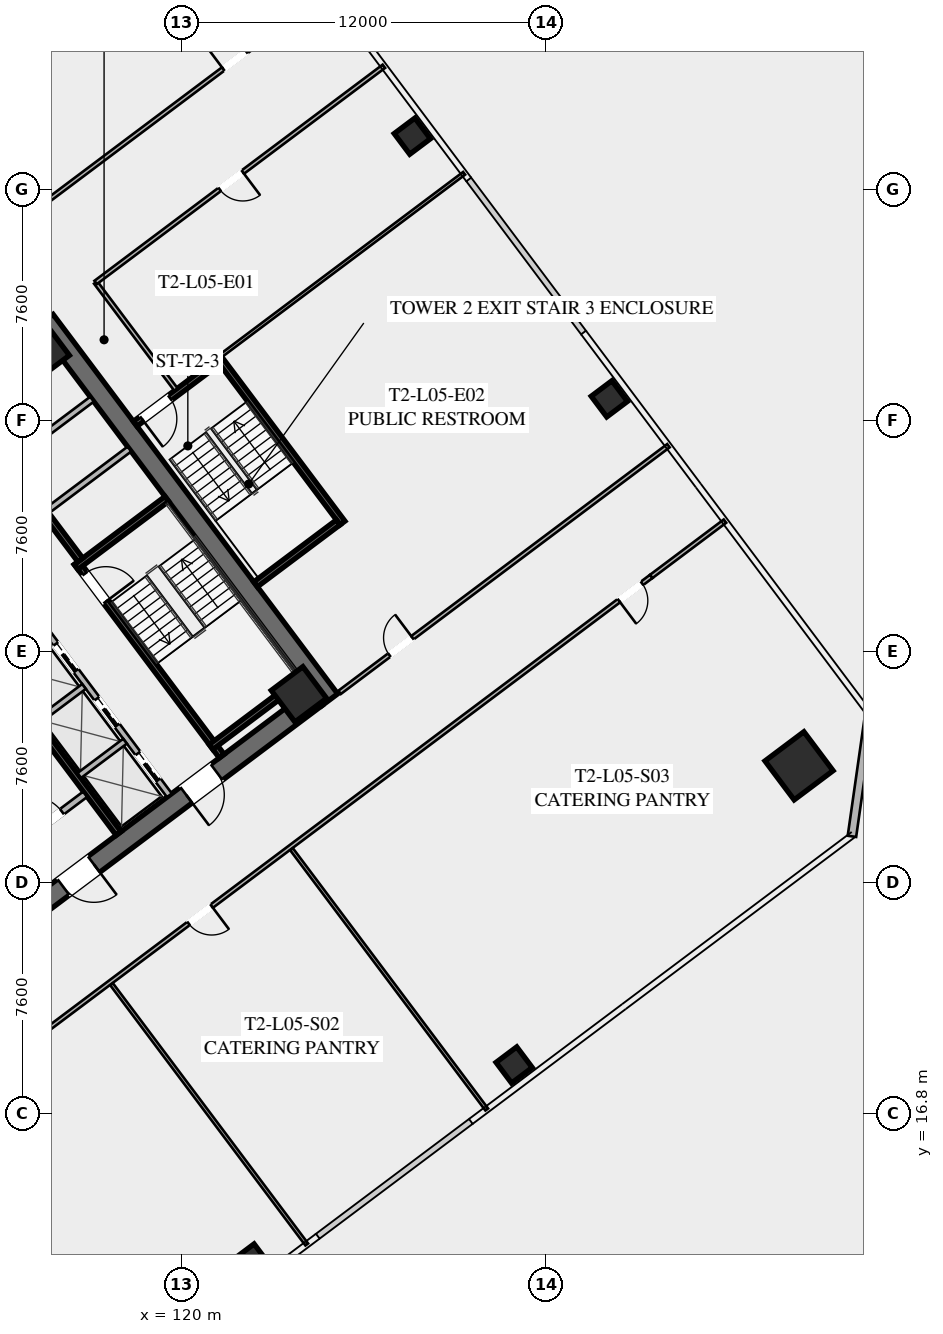
"""IFC4 building model, lengths in metres.
Left out: names, types, materials, properties, quantities, classifications, styles, units other than length and angle.
Written with IfcOpenShell. Run it as: python <this file> out.ifc"""

import sys

from ifc_helpers import new_model, si_unit, direction, frame, frame_2d, origin, origin_2d, place, context, subcontext, project, spatial, rectangle, hollow_rectangle, extrude, element, fill, save


model = new_model("IFC4")
c1 = context("Model", 3, precision=1e-05, world=origin(), true_north=direction((0.0, 1.0)))
c2 = subcontext(c1, "Body", "Model", "MODEL_VIEW")
j1 = project(units=[si_unit("LENGTHUNIT", "METRE"), si_unit("PLANEANGLEUNIT", "RADIAN")], contexts=[c1])
p1 = place(None, origin())
s1 = spatial("IfcSite", under=j1, at=p1, CompositionType="ELEMENT")
p2 = place(p1, origin())
s2 = spatial("IfcBuilding", under=s1, at=p2, CompositionType="ELEMENT")
p3 = place(p2, frame((0.0, 0.0, 24.6)))
s3 = spatial("IfcBuildingStorey", under=s2, at=p3, CompositionType="ELEMENT", Elevation=24.6)
p4 = place(p3, frame((115.524, 42.893, 0.0), z_axis=(0.0, 0.0, 1.0), x_axis=(0.600005007985, -0.799996243986, 0.0)))
e1 = element("IfcWall", 1, at=p4, inside=s3, PredefinedType="SHEAR", context=c2, shape_type="SweptSolid", body=[
    extrude(rectangle(XDim=15.6, YDim=0.65, at=frame_2d((7.8, 0.0))), origin(), (0.0, 0.0, 1.0), 3.55),
])
p5 = place(p3, frame((124.429, 30.478, 0.0), z_axis=(0.0, 0.0, 1.0), x_axis=(-0.799998028465, -0.600002628705, 0.0)))
e2 = element("IfcWall", 2, at=p5, inside=s3, PredefinedType="SHEAR", context=c2, shape_type="SweptSolid", body=[
    extrude(rectangle(XDim=14.86, YDim=0.65, at=frame_2d((7.43, 0.0))), origin(), (0.0, 0.0, 1.0), 3.55),
])
p6 = place(p5, frame((9.13, 0.0, 0.0)))
e3 = element("IfcOpeningElement", 3, at=p6, cuts=e2, PredefinedType="OPENING", context=c2, shape_type="SweptSolid", body=[
    extrude(rectangle(XDim=1.25, YDim=2.25, at=frame_2d((0.625, 1.125))), frame((0.0, 0.335, 0.0), z_axis=(0.0, -1.0, 0.0), x_axis=(1.0, 0.0, 0.0)), (0.0, 0.0, 1.0), 0.67),
])
p7 = place(p5, frame((4.08, 0.0, 0.0)))
e4 = element("IfcOpeningElement", 4, at=p7, cuts=e2, PredefinedType="OPENING", context=c2, shape_type="SweptSolid", body=[
    extrude(rectangle(XDim=1.25, YDim=2.25, at=frame_2d((0.625, 1.125))), frame((0.0, 0.335, 0.0), z_axis=(0.0, -1.0, 0.0), x_axis=(1.0, 0.0, 0.0)), (0.0, 0.0, 1.0), 0.67),
])
for number, where, z_axis, x_axis in (
    (5, (123.87, 30.59, 0.0), (0.0, 0.0, 1.0), (0.8, 0.6, 0.0)),
    (6, (115.41, 41.87, 0.0), (0.0, 0.0, 1.0), (0.8, 0.6, 0.0)),
):
    element("IfcColumn", number, at=place(p3, frame(where, z_axis=z_axis, x_axis=x_axis)), inside=s3, PredefinedType="COLUMN", context=c2, shape_type="SweptSolid", body=[
        extrude(hollow_rectangle(XDim=1.3, YDim=1.3, WallThickness=0.05, at=origin_2d()), origin(), (0.0, 0.0, 1.0), 3.35),
    ])
p8 = place(p3, frame((140.32, 28.24, 0.0), z_axis=(0.0, 0.0, 1.0), x_axis=(0.799999996291, 0.600000004945, 0.0)))
e7 = element("IfcColumn", 7, at=p8, inside=s3, PredefinedType="COLUMN", context=c2, shape_type="SweptSolid", body=[
    extrude(hollow_rectangle(XDim=1.6, YDim=1.6, WallThickness=0.06, at=origin_2d()), origin(), (0.0, 0.0, 1.0), 3.35),
])
for number, where, z_axis, x_axis in (
    (8, (122.31, 11.92, 0.0), (0.0, 0.0, 1.0), (0.8, 0.6, 0.0)),
    (9, (130.95, 18.4, 0.0), (0.0, 0.0, 1.0), (0.8, 0.6, 0.0)),
    (10, (134.08, 40.31, 0.0), (0.0, 0.0, 1.0), (0.8, 0.6, 0.0)),
    (11, (127.6, 48.95, 0.0), (0.0, 0.0, 1.0), (0.8, 0.6, 0.0)),
):
    element("IfcColumn", number, at=place(p3, frame(where, z_axis=z_axis, x_axis=x_axis)), inside=s3, PredefinedType="COLUMN", context=c2, shape_type="SweptSolid", body=[
        extrude(hollow_rectangle(XDim=0.85, YDim=0.85, WallThickness=0.035, at=origin_2d()), origin(), (0.0, 0.0, 1.0), 3.35),
    ])
p9 = place(p3, frame((142.64, 29.98, 0.0), z_axis=(0.0, 0.0, 1.0), x_axis=(-0.14137968631, -0.989955445613, 0.0)))
e12 = element("IfcWall", 12, at=p9, inside=s3, PredefinedType="SOLIDWALL", context=c2, shape_type="SweptSolid", body=[
    extrude(rectangle(XDim=4.101, YDim=0.28, at=frame_2d((2.051, 0.0))), origin(), (0.0, 0.0, 1.0), 3.35),
])
p10 = place(p3, frame((116.56, 34.92, 0.0), z_axis=(0.0, 0.0, 1.0), x_axis=(0.600009827119, -0.799992629566, 0.0)))
e13 = element("IfcWall", 13, at=p10, inside=s3, PredefinedType="SHEAR", context=c2, shape_type="SweptSolid", body=[
    extrude(rectangle(XDim=7.95, YDim=0.2, at=frame_2d((3.975, 0.0))), origin(), (0.0, 0.0, 1.0), 3.35),
])
p11 = place(p10, frame((0.45, 0.0, 0.0)))
e14 = element("IfcOpeningElement", 14, at=p11, cuts=e13, PredefinedType="OPENING", context=c2, shape_type="SweptSolid", body=[
    extrude(rectangle(XDim=1.15, YDim=2.2, at=frame_2d((0.575, 1.1))), frame((0.0, 0.11, 0.0), z_axis=(0.0, -1.0, 0.0), x_axis=(1.0, 0.0, 0.0)), (0.0, 0.0, 1.0), 0.22),
])
for number, where, z_axis, x_axis in (
    (15, (116.54, 34.78, 0.0), (0.0, 0.0, 1.0), (0.8, 0.6, 0.0)),
    (16, (120.98, 28.86, 0.0), (0.0, 0.0, 1.0), (0.8, 0.6, 0.0)),
):
    element("IfcWall", number, at=place(p3, frame(where, z_axis=z_axis, x_axis=x_axis)), inside=s3, PredefinedType="SHEAR", context=c2, shape_type="SweptSolid", body=[
        extrude(rectangle(XDim=3.73, YDim=0.2, at=frame_2d((1.865, 0.0))), origin(), (0.0, 0.0, 1.0), 3.35),
    ])
p12 = place(p3, frame((117.938, 26.016, 0.0), z_axis=(0.0, 0.0, 1.0), x_axis=(-0.600005463273, 0.799995902516, 0.0)))
e17 = element("IfcWall", 17, at=p12, inside=s3, PredefinedType="SHEAR", context=c2, shape_type="SweptSolid", body=[
    extrude(rectangle(XDim=14.3, YDim=0.2, at=frame_2d((7.15, 0.0))), origin(), (0.0, 0.0, 1.0), 3.35),
])
p13 = place(p3, frame((114.316, 25.412, 0.0), z_axis=(0.0, 0.0, 1.0), x_axis=(0.800018601094, 0.59997519774, 0.0)))
e18 = element("IfcWall", 18, at=p13, inside=s3, PredefinedType="SOLIDWALL", context=c2, shape_type="SweptSolid", body=[
    extrude(rectangle(XDim=3.15, YDim=0.22, at=frame_2d((1.575, 0.0))), origin(), (0.0, 0.0, 1.0), 2.703),
])
p14 = place(p13, frame((0.95, 0.0, 0.0)))
e19 = element("IfcOpeningElement", 19, at=p14, cuts=e18, PredefinedType="OPENING", context=c2, shape_type="SweptSolid", body=[
    extrude(rectangle(XDim=1.25, YDim=2.25, at=frame_2d((0.625, 1.125))), frame((0.0, 0.12, 0.0), z_axis=(0.0, -1.0, 0.0), x_axis=(1.0, 0.0, 0.0)), (0.0, 0.0, 1.0), 0.24),
])
p15 = place(p3, frame((112.87, 40.09, 0.0), z_axis=(0.0, 0.0, 1.0), x_axis=(0.599975393228, -0.800018454488, 0.0)))
e20 = element("IfcWall", 20, at=p15, inside=s3, PredefinedType="SHEAR", context=c2, shape_type="SweptSolid", body=[
    extrude(rectangle(XDim=6.35, YDim=0.2, at=frame_2d((3.175, 0.0))), origin(), (0.0, 0.0, 1.0), 3.35),
])
for number, where, z_axis, x_axis in (
    (21, (115.59, 36.63, 0.0), (0.0, 0.0, 1.0), (0.8, 0.6, 0.0)),
    (22, (114.36, 38.27, 0.0), (0.0, 0.0, 1.0), (0.8, 0.6, 0.0)),
):
    element("IfcWall", number, at=place(p3, frame(where, z_axis=z_axis, x_axis=x_axis)), inside=s3, PredefinedType="SOLIDWALL", context=c2, shape_type="SweptSolid", body=[
        extrude(rectangle(XDim=3.38, YDim=0.2, at=frame_2d((1.69, 0.0))), origin(), (0.0, 0.0, 1.0), 3.35),
    ])
p16 = place(p3, frame((119.61, 27.27, 0.0), z_axis=(0.0, 0.0, 1.0), x_axis=(-0.600011488909, 0.79999138319, 0.0)))
e23 = element("IfcWall", 23, at=p16, inside=s3, PredefinedType="SOLIDWALL", context=c2, shape_type="SweptSolid", body=[
    extrude(rectangle(XDim=6.8, YDim=0.2, at=frame_2d((3.4, 0.0))), origin(), (0.0, 0.0, 1.0), 3.35),
])
p17 = place(p16, frame((0.625, 0.0, 0.0)))
e24 = element("IfcOpeningElement", 24, at=p17, cuts=e23, PredefinedType="OPENING", context=c2, shape_type="SweptSolid", body=[
    extrude(rectangle(XDim=1.1, YDim=2.2, at=frame_2d((0.55, 1.1))), frame((0.0, 0.11, 0.0), z_axis=(0.0, -1.0, 0.0), x_axis=(1.0, 0.0, 0.0)), (0.0, 0.0, 1.0), 0.22),
])
p18 = place(p16, frame((2.875, 0.0, 0.0)))
e25 = element("IfcOpeningElement", 25, at=p18, cuts=e23, PredefinedType="OPENING", context=c2, shape_type="SweptSolid", body=[
    extrude(rectangle(XDim=1.1, YDim=2.2, at=frame_2d((0.55, 1.1))), frame((0.0, 0.11, 0.0), z_axis=(0.0, -1.0, 0.0), x_axis=(1.0, 0.0, 0.0)), (0.0, 0.0, 1.0), 0.22),
])
p19 = place(p16, frame((5.125, 0.0, 0.0)))
e26 = element("IfcOpeningElement", 26, at=p19, cuts=e23, PredefinedType="OPENING", context=c2, shape_type="SweptSolid", body=[
    extrude(rectangle(XDim=1.1, YDim=2.2, at=frame_2d((0.55, 1.1))), frame((0.0, 0.11, 0.0), z_axis=(0.0, -1.0, 0.0), x_axis=(1.0, 0.0, 0.0)), (0.0, 0.0, 1.0), 0.22),
])
p20 = place(p3, frame((116.646, 27.922, 0.0), z_axis=(0.0, 0.0, 1.0), x_axis=(0.8, 0.6, 0.0)))
e27 = element("IfcWall", 27, at=p20, inside=s3, PredefinedType="SOLIDWALL", context=c2, shape_type="SweptSolid", body=[
    extrude(rectangle(XDim=1.88, YDim=0.2, at=frame_2d((0.94, 0.0))), origin(), (0.0, 0.0, 1.0), 3.35),
])
p21 = place(p3, frame((115.296, 29.722, 0.0), z_axis=(0.0, 0.0, 1.0), x_axis=(0.799984418148, 0.600020775241, 0.0)))
e28 = element("IfcWall", 28, at=p21, inside=s3, PredefinedType="SOLIDWALL", context=c2, shape_type="SweptSolid", body=[
    extrude(rectangle(XDim=1.88, YDim=0.2, at=frame_2d((0.94, 0.0))), origin(), (0.0, 0.0, 1.0), 3.35),
])
p22 = place(p3, frame((125.304, 36.228, 0.0), z_axis=(0.0, 0.0, 1.0), x_axis=(-0.59998851072, 0.800008616831, 0.0)))
e29 = element("IfcWall", 29, at=p22, inside=s3, PredefinedType="SHEAR", context=c2, shape_type="SweptSolid", body=[
    extrude(rectangle(XDim=6.8, YDim=0.2, at=frame_2d((3.4, 0.0))), origin(), (0.0, 0.0, 1.0), 3.35),
])
p23 = place(p3, frame((121.204, 41.528, 0.0), z_axis=(0.0, 0.0, 1.0), x_axis=(-0.800017232136, -0.599977023131, 0.0)))
e30 = element("IfcWall", 30, at=p23, inside=s3, PredefinedType="SHEAR", context=c2, shape_type="SweptSolid", body=[
    extrude(rectangle(XDim=3.4, YDim=0.2, at=frame_2d((1.7, 0.0))), origin(), (0.0, 0.0, 1.0), 3.35),
])
p24 = place(p23, frame((1.975, 0.0, 0.0)))
e31 = element("IfcOpeningElement", 31, at=p24, cuts=e30, PredefinedType="OPENING", context=c2, shape_type="SweptSolid", body=[
    extrude(rectangle(XDim=1.15, YDim=2.2, at=frame_2d((0.575, 1.1))), frame((0.0, 0.11, 0.0), z_axis=(0.0, -1.0, 0.0), x_axis=(1.0, 0.0, 0.0)), (0.0, 0.0, 1.0), 0.22),
])
p25 = place(p3, frame((122.444, 34.208, 0.0), z_axis=(0.0, 0.0, 1.0), x_axis=(0.79999138319, 0.600011488909, 0.0)))
e32 = element("IfcWall", 32, at=p25, inside=s3, PredefinedType="SHEAR", context=c2, shape_type="SweptSolid", body=[
    extrude(rectangle(XDim=3.4, YDim=0.2, at=frame_2d((1.7, 0.0))), origin(), (0.0, 0.0, 1.0), 3.35),
])
p26 = place(p3, frame((119.824, 40.618, 0.0), z_axis=(0.0, 0.0, 1.0), x_axis=(-0.599982243973, 0.800013316712, 0.0)))
e33 = element("IfcWall", 33, at=p26, inside=s3, PredefinedType="PARTITIONING", context=c2, shape_type="SweptSolid", body=[
    extrude(rectangle(XDim=4.4, YDim=0.135, at=frame_2d((2.2, 0.0))), origin(), (0.0, 0.0, 1.0), 2.703),
])
p27 = place(p3, frame((98.516, 34.012, 0.0), z_axis=(0.0, 0.0, 1.0), x_axis=(0.799998035726, 0.600002619023, 0.0)))
e34 = element("IfcWall", 34, at=p27, inside=s3, PredefinedType="PARTITIONING", context=c2, shape_type="SweptSolid", body=[
    extrude(rectangle(XDim=29.83, YDim=0.135, at=frame_2d((14.915, 0.0))), origin(), (0.0, 0.0, 1.0), 2.703),
])
p28 = place(p27, frame((0.3, 0.0, 0.0)))
e35 = element("IfcOpeningElement", 35, at=p28, cuts=e34, PredefinedType="OPENING", context=c2, shape_type="SweptSolid", body=[
    extrude(rectangle(XDim=0.95, YDim=2.05, at=frame_2d((0.475, 1.025))), frame((0.0, 0.077, 0.0), z_axis=(0.0, -1.0, 0.0), x_axis=(1.0, 0.0, 0.0)), (0.0, 0.0, 1.0), 0.155),
])
p29 = place(p27, frame((10.829, 0.0, 0.0)))
e36 = element("IfcOpeningElement", 36, at=p29, cuts=e34, PredefinedType="OPENING", context=c2, shape_type="SweptSolid", body=[
    extrude(rectangle(XDim=0.95, YDim=2.05, at=frame_2d((0.475, 1.025))), frame((0.0, 0.077, 0.0), z_axis=(0.0, -1.0, 0.0), x_axis=(1.0, 0.0, 0.0)), (0.0, 0.0, 1.0), 0.155),
])
p30 = place(p27, frame((28.58, 0.0, 0.0)))
e37 = element("IfcOpeningElement", 37, at=p30, cuts=e34, PredefinedType="OPENING", context=c2, shape_type="SweptSolid", body=[
    extrude(rectangle(XDim=0.95, YDim=2.05, at=frame_2d((0.475, 1.025))), frame((0.0, 0.077, 0.0), z_axis=(0.0, -1.0, 0.0), x_axis=(1.0, 0.0, 0.0)), (0.0, 0.0, 1.0), 0.155),
])
p31 = place(p3, frame((135.46, 34.47, 0.0), z_axis=(0.0, 0.0, 1.0), x_axis=(-0.800000982127, -0.599998690494, 0.0)))
e38 = element("IfcWall", 38, at=p31, inside=s3, PredefinedType="PARTITIONING", context=c2, shape_type="SweptSolid", body=[
    extrude(rectangle(XDim=29.83, YDim=0.135, at=frame_2d((14.915, 0.0))), origin(), (0.0, 0.0, 1.0), 2.703),
])
p32 = place(p31, frame((28.5, 0.0, 0.0)))
e39 = element("IfcOpeningElement", 39, at=p32, cuts=e38, PredefinedType="OPENING", context=c2, shape_type="SweptSolid", body=[
    extrude(rectangle(XDim=0.95, YDim=2.05, at=frame_2d((0.475, 1.025))), frame((0.0, 0.077, 0.0), z_axis=(0.0, -1.0, 0.0), x_axis=(1.0, 0.0, 0.0)), (0.0, 0.0, 1.0), 0.155),
])
p33 = place(p31, frame((18.075, 0.0, 0.0)))
e40 = element("IfcOpeningElement", 40, at=p33, cuts=e38, PredefinedType="OPENING", context=c2, shape_type="SweptSolid", body=[
    extrude(rectangle(XDim=0.95, YDim=2.05, at=frame_2d((0.475, 1.025))), frame((0.0, 0.077, 0.0), z_axis=(0.0, -1.0, 0.0), x_axis=(1.0, 0.0, 0.0)), (0.0, 0.0, 1.0), 0.155),
])
p34 = place(p31, frame((0.38, 0.0, 0.0)))
e41 = element("IfcOpeningElement", 41, at=p34, cuts=e38, PredefinedType="OPENING", context=c2, shape_type="SweptSolid", body=[
    extrude(rectangle(XDim=0.95, YDim=2.05, at=frame_2d((0.475, 1.025))), frame((0.0, 0.077, 0.0), z_axis=(0.0, -1.0, 0.0), x_axis=(1.0, 0.0, 0.0)), (0.0, 0.0, 1.0), 0.155),
])
p35 = place(p3, frame((135.46, 34.47, 0.0), z_axis=(0.0, 0.0, 1.0), x_axis=(0.799990331366, 0.600012891296, 0.0)))
e42 = element("IfcWall", 42, at=p35, inside=s3, PredefinedType="PARTITIONING", context=c2, shape_type="SweptSolid", body=[
    extrude(rectangle(XDim=3.03, YDim=0.135, at=frame_2d((1.515, 0.0))), origin(), (0.0, 0.0, 1.0), 2.703),
])
p36 = place(p3, frame((124.128, 12.496, 0.0), z_axis=(0.0, 0.0, 1.0), x_axis=(-0.600003650761, 0.799997261916, 0.0)))
e43 = element("IfcWall", 43, at=p36, inside=s3, PredefinedType="PARTITIONING", context=c2, shape_type="SweptSolid", body=[
    extrude(rectangle(XDim=10.7, YDim=0.11, at=frame_2d((5.35, 0.0))), origin(), (0.0, 0.0, 1.0), 2.703),
])
p37 = place(p3, frame((130.048, 16.936, 0.0), z_axis=(0.0, 0.0, 1.0), x_axis=(-0.600007301277, 0.79999452399, 0.0)))
e44 = element("IfcWall", 44, at=p37, inside=s3, PredefinedType="PARTITIONING", context=c2, shape_type="SweptSolid", body=[
    extrude(rectangle(XDim=10.7, YDim=0.11, at=frame_2d((5.35, 0.0))), origin(), (0.0, 0.0, 1.0), 2.703),
])
p38 = place(p3, frame((126.664, 51.248, 0.0), z_axis=(0.0, 0.0, 1.0), x_axis=(-0.799995055373, -0.600006592779, 0.0)))
e45 = element("IfcWall", 45, at=p38, inside=s3, PredefinedType="PARTITIONING", context=c2, shape_type="SweptSolid", body=[
    extrude(rectangle(XDim=11.85, YDim=0.135, at=frame_2d((5.925, 0.0))), origin(), (0.0, 0.0, 1.0), 2.703),
])
p39 = place(p38, frame((5.8, 0.0, 0.0)))
e46 = element("IfcOpeningElement", 46, at=p39, cuts=e45, PredefinedType="OPENING", context=c2, shape_type="SweptSolid", body=[
    extrude(rectangle(XDim=0.95, YDim=2.05, at=frame_2d((0.475, 1.025))), frame((0.0, 0.077, 0.0), z_axis=(0.0, -1.0, 0.0), x_axis=(1.0, 0.0, 0.0)), (0.0, 0.0, 1.0), 0.155),
])
p40 = place(p3, frame((125.208, 30.656, 0.0), z_axis=(0.0, 0.0, 1.0), x_axis=(0.799995666112, 0.600005778473, 0.0)))
e47 = element("IfcWall", 47, at=p40, inside=s3, PredefinedType="PARTITIONING", context=c2, shape_type="SweptSolid", body=[
    extrude(rectangle(XDim=13.52, YDim=0.135, at=frame_2d((6.76, 0.0))), origin(), (0.0, 0.0, 1.0), 2.703),
])
p41 = place(p40, frame((2.045, 0.0, 0.0)))
e48 = element("IfcOpeningElement", 48, at=p41, cuts=e47, PredefinedType="OPENING", context=c2, shape_type="SweptSolid", body=[
    extrude(rectangle(XDim=0.95, YDim=2.05, at=frame_2d((0.475, 1.025))), frame((0.0, 0.077, 0.0), z_axis=(0.0, -1.0, 0.0), x_axis=(1.0, 0.0, 0.0)), (0.0, 0.0, 1.0), 0.155),
])
p42 = place(p3, frame((129.304, 47.728, 0.0), z_axis=(0.0, 0.0, 1.0), x_axis=(-0.8, -0.6, 0.0)))
e49 = element("IfcWall", 49, at=p42, inside=s3, PredefinedType="PARTITIONING", context=c2, shape_type="SweptSolid", body=[
    extrude(rectangle(XDim=10.0, YDim=0.11, at=frame_2d((5.0, 0.0))), origin(), (0.0, 0.0, 1.0), 2.703),
])
p43 = place(p6, origin())
e50 = element("IfcDoor", 50, at=p43, inside=s3, OperationType="SINGLE_SWING_LEFT", PredefinedType="DOOR", context=c2, shape_type="SweptSolid", body=[
    extrude(rectangle(XDim=1.25, YDim=2.25, at=frame_2d((0.625, 1.125))), frame((0.0, 0.025, 0.0), z_axis=(0.0, -1.0, 0.0), x_axis=(1.0, 0.0, 0.0)), (0.0, 0.0, 1.0), 0.05),
])
fill(e3, e50)
p44 = place(p7, origin())
e51 = element("IfcDoor", 51, at=p44, inside=s3, OperationType="SINGLE_SWING_RIGHT", PredefinedType="DOOR", context=c2, shape_type="SweptSolid", body=[
    extrude(rectangle(XDim=1.25, YDim=2.25, at=frame_2d((0.625, 1.125))), frame((0.0, 0.025, 0.0), z_axis=(0.0, -1.0, 0.0), x_axis=(1.0, 0.0, 0.0)), (0.0, 0.0, 1.0), 0.05),
])
fill(e4, e51)
p45 = place(p11, origin())
e52 = element("IfcDoor", 52, at=p45, inside=s3, OperationType="SINGLE_SWING_RIGHT", PredefinedType="DOOR", context=c2, shape_type="SweptSolid", body=[
    extrude(rectangle(XDim=1.15, YDim=2.2, at=frame_2d((0.575, 1.1))), frame((0.0, 0.025, 0.0), z_axis=(0.0, -1.0, 0.0), x_axis=(1.0, 0.0, 0.0)), (0.0, 0.0, 1.0), 0.05),
])
fill(e14, e52)
p46 = place(p14, origin())
e53 = element("IfcDoor", 53, at=p46, inside=s3, OperationType="SINGLE_SWING_LEFT", PredefinedType="DOOR", context=c2, shape_type="SweptSolid", body=[
    extrude(rectangle(XDim=1.25, YDim=2.25, at=frame_2d((0.625, 1.125))), frame((0.0, 0.025, 0.0), z_axis=(0.0, -1.0, 0.0), x_axis=(1.0, 0.0, 0.0)), (0.0, 0.0, 1.0), 0.05),
])
fill(e19, e53)
p47 = place(p24, origin())
e54 = element("IfcDoor", 54, at=p47, inside=s3, OperationType="SINGLE_SWING_RIGHT", PredefinedType="DOOR", context=c2, shape_type="SweptSolid", body=[
    extrude(rectangle(XDim=1.15, YDim=2.2, at=frame_2d((0.575, 1.1))), frame((0.0, 0.025, 0.0), z_axis=(0.0, -1.0, 0.0), x_axis=(1.0, 0.0, 0.0)), (0.0, 0.0, 1.0), 0.05),
])
fill(e31, e54)
p48 = place(p30, origin())
e55 = element("IfcDoor", 55, at=p48, inside=s3, OperationType="SINGLE_SWING_LEFT", PredefinedType="DOOR", context=c2, shape_type="SweptSolid", body=[
    extrude(rectangle(XDim=0.95, YDim=2.05, at=frame_2d((0.475, 1.025))), frame((0.0, 0.025, 0.0), z_axis=(0.0, -1.0, 0.0), x_axis=(1.0, 0.0, 0.0)), (0.0, 0.0, 1.0), 0.05),
])
fill(e37, e55)
p49 = place(p33, origin())
e56 = element("IfcDoor", 56, at=p49, inside=s3, OperationType="SINGLE_SWING_LEFT", PredefinedType="DOOR", context=c2, shape_type="SweptSolid", body=[
    extrude(rectangle(XDim=0.95, YDim=2.05, at=frame_2d((0.475, 1.025))), frame((0.0, 0.025, 0.0), z_axis=(0.0, -1.0, 0.0), x_axis=(1.0, 0.0, 0.0)), (0.0, 0.0, 1.0), 0.05),
])
fill(e40, e56)
p50 = place(p34, origin())
e57 = element("IfcDoor", 57, at=p50, inside=s3, OperationType="SINGLE_SWING_RIGHT", PredefinedType="DOOR", context=c2, shape_type="SweptSolid", body=[
    extrude(rectangle(XDim=0.95, YDim=2.05, at=frame_2d((0.475, 1.025))), frame((0.0, 0.025, 0.0), z_axis=(0.0, -1.0, 0.0), x_axis=(1.0, 0.0, 0.0)), (0.0, 0.0, 1.0), 0.05),
])
fill(e41, e57)
p51 = place(p39, origin())
e58 = element("IfcDoor", 58, at=p51, inside=s3, OperationType="SINGLE_SWING_LEFT", PredefinedType="DOOR", context=c2, shape_type="SweptSolid", body=[
    extrude(rectangle(XDim=0.95, YDim=2.05, at=frame_2d((0.475, 1.025))), frame((0.0, 0.025, 0.0), z_axis=(0.0, -1.0, 0.0), x_axis=(1.0, 0.0, 0.0)), (0.0, 0.0, 1.0), 0.05),
])
fill(e46, e58)
p52 = place(p41, origin())
e59 = element("IfcDoor", 59, at=p52, inside=s3, OperationType="SINGLE_SWING_RIGHT", PredefinedType="DOOR", context=c2, shape_type="SweptSolid", body=[
    extrude(rectangle(XDim=0.95, YDim=2.05, at=frame_2d((0.475, 1.025))), frame((0.0, 0.025, 0.0), z_axis=(0.0, -1.0, 0.0), x_axis=(1.0, 0.0, 0.0)), (0.0, 0.0, 1.0), 0.05),
])
fill(e48, e59)
p53 = place(p17, origin())
e60 = element("IfcDoor", 60, at=p53, inside=s3, OperationType="SLIDING_TO_LEFT", PredefinedType="DOOR", context=c2, shape_type="SweptSolid", body=[
    extrude(rectangle(XDim=1.1, YDim=2.2, at=frame_2d((0.55, 1.1))), frame((0.0, 0.025, 0.0), z_axis=(0.0, -1.0, 0.0), x_axis=(1.0, 0.0, 0.0)), (0.0, 0.0, 1.0), 0.05),
])
fill(e24, e60)
p54 = place(p18, origin())
e61 = element("IfcDoor", 61, at=p54, inside=s3, OperationType="SLIDING_TO_LEFT", PredefinedType="DOOR", context=c2, shape_type="SweptSolid", body=[
    extrude(rectangle(XDim=1.1, YDim=2.2, at=frame_2d((0.55, 1.1))), frame((0.0, 0.025, 0.0), z_axis=(0.0, -1.0, 0.0), x_axis=(1.0, 0.0, 0.0)), (0.0, 0.0, 1.0), 0.05),
])
fill(e25, e61)
p55 = place(p19, origin())
e62 = element("IfcDoor", 62, at=p55, inside=s3, OperationType="SLIDING_TO_LEFT", PredefinedType="DOOR", context=c2, shape_type="SweptSolid", body=[
    extrude(rectangle(XDim=1.1, YDim=2.2, at=frame_2d((0.55, 1.1))), frame((0.0, 0.025, 0.0), z_axis=(0.0, -1.0, 0.0), x_axis=(1.0, 0.0, 0.0)), (0.0, 0.0, 1.0), 0.05),
])
fill(e26, e62)
save(model, sys.argv[1])
